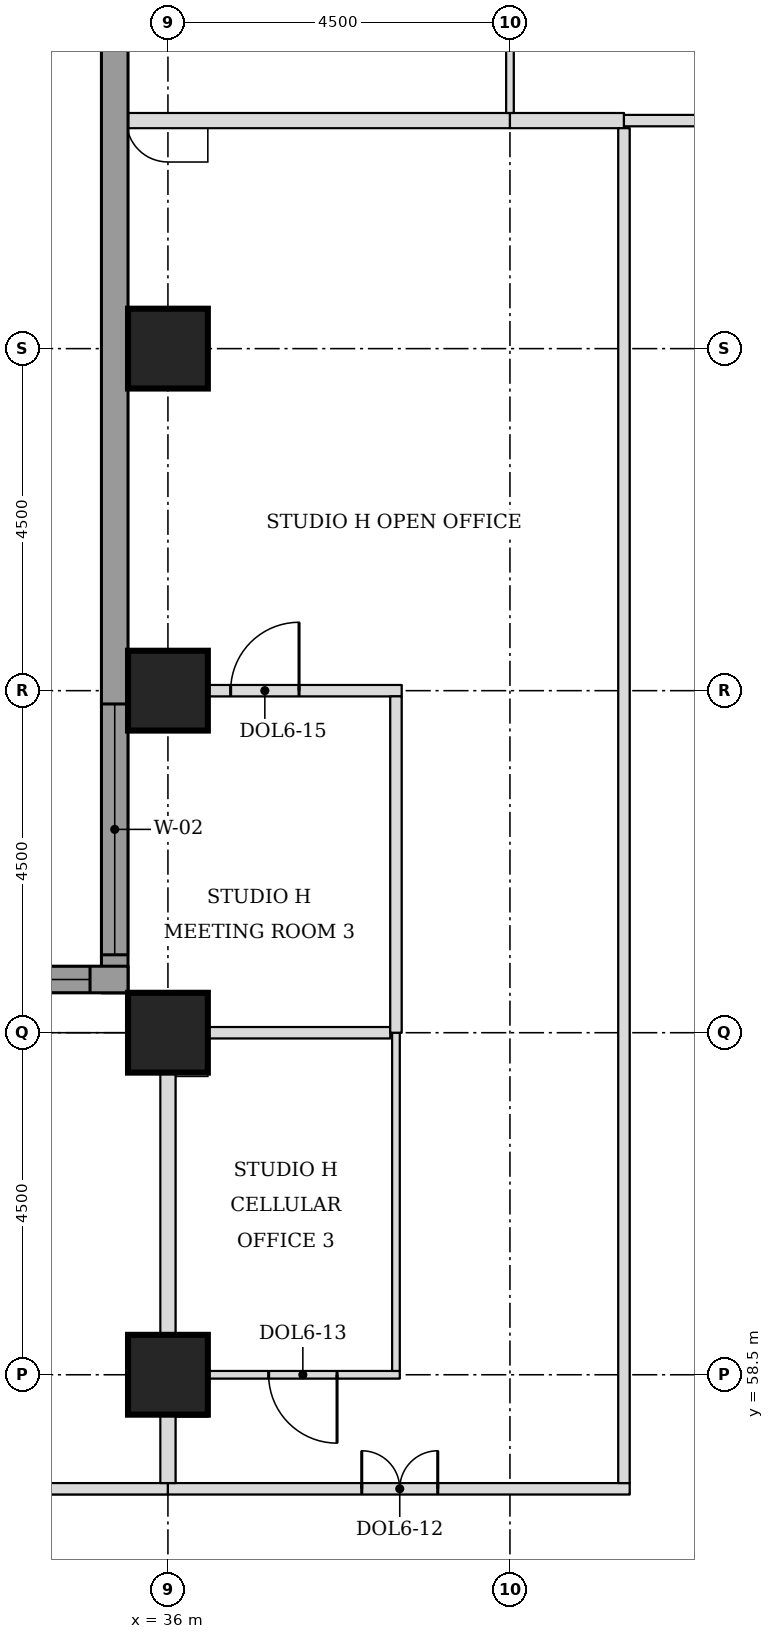
"""IFC4 building model, lengths in metres.
Left out: names, types, materials, properties, quantities, classifications, styles, units other than length and angle.
Written with IfcOpenShell. Run it as: python <this file> out.ifc"""

import sys

from ifc_helpers import new_model, si_unit, direction, frame, frame_2d, origin, origin_2d, place, context, subcontext, project, spatial, rectangle, extrude, element, fill, save


model = new_model("IFC4")
c1 = context("Model", 3, precision=1e-05, world=origin(), true_north=direction((0.0, 1.0)))
c2 = subcontext(c1, "Body", "Model", "MODEL_VIEW")
j1 = project(units=[si_unit("LENGTHUNIT", "METRE"), si_unit("PLANEANGLEUNIT", "RADIAN")], contexts=[c1])
p1 = place(None, origin())
s1 = spatial("IfcSite", under=j1, at=p1, CompositionType="ELEMENT")
p2 = place(p1, origin())
s2 = spatial("IfcBuilding", under=s1, at=p2, CompositionType="ELEMENT")
p3 = place(p2, frame((0.0, 0.0, 115.9)))
s3 = spatial("IfcBuildingStorey", under=s2, at=p3, CompositionType="ELEMENT", Elevation=115.9)
for number, where, z_axis, x_axis in (
    (1, (36.0, 58.5, 0.0), (0.0, 0.0, 1.0), (1.0, 0.0, 0.0)),
    (2, (36.0, 63.0, 0.0), (0.0, 0.0, 1.0), (1.0, 0.0, 0.0)),
    (3, (36.0, 67.5, 0.0), (0.0, 0.0, 1.0), (1.0, 0.0, 0.0)),
    (4, (36.0, 72.0, 0.0), (0.0, 0.0, 1.0), (1.0, 0.0, 0.0)),
):
    element("IfcColumn", number, at=place(p3, frame(where, z_axis=z_axis, x_axis=x_axis)), inside=s3, PredefinedType="COLUMN", context=c2, shape_type="SweptSolid", body=[
        extrude(rectangle(XDim=1.05, YDim=1.05, at=origin_2d()), origin(), (0.0, 0.0, 1.0), 3.7),
    ])
p4 = place(p3, frame((35.3, 76.862, 0.0), z_axis=(0.0, 0.0, 1.0), x_axis=(0.0, -1.0, 0.0)))
e5 = element("IfcWall", 5, at=p4, inside=s3, PredefinedType="STANDARD", context=c2, shape_type="SweptSolid", body=[
    extrude(rectangle(XDim=13.337, YDim=0.35, at=frame_2d((6.669, 0.0))), origin(), (0.0, 0.0, 1.0), 3.525),
])
p5 = place(p4, frame((9.537, 0.0, 0.9)))
e6 = element("IfcOpeningElement", 6, at=p5, cuts=e5, PredefinedType="OPENING", context=c2, shape_type="SweptSolid", body=[
    extrude(rectangle(XDim=3.3, YDim=1.9, at=frame_2d((1.65, 0.95))), frame((0.0, 0.185, 0.0), z_axis=(0.0, -1.0, 0.0), x_axis=(1.0, 0.0, 0.0)), (0.0, 0.0, 1.0), 0.37),
])
p6 = place(p3, frame((35.475, 63.7, 0.0), z_axis=(0.0, 0.0, 1.0), x_axis=(-1.0, 0.0, 0.0)))
e7 = element("IfcWall", 7, at=p6, inside=s3, PredefinedType="STANDARD", context=c2, shape_type="SweptSolid", body=[
    extrude(rectangle(XDim=17.837, YDim=0.35, at=frame_2d((8.919, 0.0))), origin(), (0.0, 0.0, 1.0), 3.525),
])
p7 = place(p6, frame((0.5, 0.0, 0.9)))
e8 = element("IfcOpeningElement", 8, at=p7, cuts=e7, PredefinedType="OPENING", context=c2, shape_type="SweptSolid", body=[
    extrude(rectangle(XDim=3.3, YDim=1.9, at=frame_2d((1.65, 0.95))), frame((0.0, 0.185, 0.0), z_axis=(0.0, -1.0, 0.0), x_axis=(1.0, 0.0, 0.0)), (0.0, 0.0, 1.0), 0.37),
])
p8 = place(p6, frame((9.075, 0.0, 0.9)))
e9 = element("IfcOpeningElement", 9, at=p8, cuts=e7, PredefinedType="OPENING", context=c2, shape_type="SweptSolid", body=[
    extrude(rectangle(XDim=3.3, YDim=1.9, at=frame_2d((1.65, 0.95))), frame((0.0, 0.185, 0.0), z_axis=(0.0, -1.0, 0.0), x_axis=(1.0, 0.0, 0.0)), (0.0, 0.0, 1.0), 0.37),
])
p9 = place(p3, frame((29.38, 57.0, 0.0), z_axis=(0.0, 0.0, 1.0), x_axis=(1.0, 0.0, 0.0)))
e10 = element("IfcWall", 10, at=p9, inside=s3, PredefinedType="PARTITIONING", context=c2, shape_type="SweptSolid", body=[
    extrude(rectangle(XDim=6.62, YDim=0.15, at=frame_2d((3.31, 0.0))), origin(), (0.0, 0.0, 1.0), 3.55),
])
p10 = place(p9, frame((2.88, 0.0, 0.0)))
e11 = element("IfcOpeningElement", 11, at=p10, cuts=e10, PredefinedType="OPENING", context=c2, shape_type="SweptSolid", body=[
    extrude(rectangle(XDim=1.0, YDim=2.1, at=frame_2d((0.5, 1.05))), frame((0.0, 0.085, 0.0), z_axis=(0.0, -1.0, 0.0), x_axis=(1.0, 0.0, 0.0)), (0.0, 0.0, 1.0), 0.17),
])
p11 = place(p3, frame((36.0, 57.0, 0.0), z_axis=(0.0, 0.0, 1.0), x_axis=(1.0, 0.0, 0.0)))
e12 = element("IfcWall", 12, at=p11, inside=s3, PredefinedType="PARTITIONING", context=c2, shape_type="SweptSolid", body=[
    extrude(rectangle(XDim=6.075, YDim=0.15, at=frame_2d((3.038, 0.0))), origin(), (0.0, 0.0, 1.0), 3.55),
])
p12 = place(p11, frame((2.55, 0.0, 0.0)))
e13 = element("IfcOpeningElement", 13, at=p12, cuts=e12, PredefinedType="OPENING", context=c2, shape_type="SweptSolid", body=[
    extrude(rectangle(XDim=1.0, YDim=2.1, at=frame_2d((0.5, 1.05))), frame((0.0, 0.085, 0.0), z_axis=(0.0, -1.0, 0.0), x_axis=(1.0, 0.0, 0.0)), (0.0, 0.0, 1.0), 0.17),
])
p13 = place(p3, frame((36.525, 58.5, 0.0), z_axis=(0.0, 0.0, 1.0), x_axis=(1.0, 0.0, 0.0)))
e14 = element("IfcWall", 14, at=p13, inside=s3, PredefinedType="PARTITIONING", context=c2, shape_type="SweptSolid", body=[
    extrude(rectangle(XDim=2.525, YDim=0.1, at=frame_2d((1.263, 0.0))), origin(), (0.0, 0.0, 1.0), 3.55),
])
p14 = place(p13, frame((0.8, 0.0, 0.0)))
e15 = element("IfcOpeningElement", 15, at=p14, cuts=e14, PredefinedType="OPENING", context=c2, shape_type="SweptSolid", body=[
    extrude(rectangle(XDim=0.9, YDim=2.1, at=frame_2d((0.45, 1.05))), frame((0.0, 0.06, 0.0), z_axis=(0.0, -1.0, 0.0), x_axis=(1.0, 0.0, 0.0)), (0.0, 0.0, 1.0), 0.12),
])
p15 = place(p3, frame((36.525, 63.0, 0.0), z_axis=(0.0, 0.0, 1.0), x_axis=(1.0, 0.0, 0.0)))
e16 = element("IfcWall", 16, at=p15, inside=s3, PredefinedType="PARTITIONING", context=c2, shape_type="SweptSolid", body=[
    extrude(rectangle(XDim=2.4, YDim=0.15, at=frame_2d((1.2, 0.0))), origin(), (0.0, 0.0, 1.0), 3.55),
])
p16 = place(p3, frame((35.475, 67.5, 0.0), z_axis=(0.0, 0.0, 1.0), x_axis=(1.0, 0.0, 0.0)))
e17 = element("IfcWall", 17, at=p16, inside=s3, PredefinedType="PARTITIONING", context=c2, shape_type="SweptSolid", body=[
    extrude(rectangle(XDim=3.6, YDim=0.15, at=frame_2d((1.8, 0.0))), origin(), (0.0, 0.0, 1.0), 3.55),
])
p17 = place(p16, frame((1.35, 0.0, 0.0)))
e18 = element("IfcOpeningElement", 18, at=p17, cuts=e17, PredefinedType="OPENING", context=c2, shape_type="SweptSolid", body=[
    extrude(rectangle(XDim=0.9, YDim=2.1, at=frame_2d((0.45, 1.05))), frame((0.0, 0.085, 0.0), z_axis=(0.0, -1.0, 0.0), x_axis=(1.0, 0.0, 0.0)), (0.0, 0.0, 1.0), 0.17),
])
p18 = place(p3, frame((35.475, 75.0, 0.0), z_axis=(0.0, 0.0, 1.0), x_axis=(1.0, 0.0, 0.0)))
e19 = element("IfcWall", 19, at=p18, inside=s3, PredefinedType="PARTITIONING", context=c2, shape_type="SweptSolid", body=[
    extrude(rectangle(XDim=5.025, YDim=0.2, at=frame_2d((2.512, 0.0))), origin(), (0.0, 0.0, 1.0), 3.55),
])
p19 = place(p3, frame((40.5, 75.0, 0.0), z_axis=(0.0, 0.0, 1.0), x_axis=(1.0, 0.0, 0.0)))
e20 = element("IfcWall", 20, at=p19, inside=s3, PredefinedType="PARTITIONING", context=c2, shape_type="SweptSolid", body=[
    extrude(rectangle(XDim=1.5, YDim=0.2, at=frame_2d((0.75, 0.0))), origin(), (0.0, 0.0, 1.0), 3.55),
])
p20 = place(p3, frame((42.0, 75.0, 0.0), z_axis=(0.0, 0.0, 1.0), x_axis=(1.0, 0.0, 0.0)))
e21 = element("IfcWall", 21, at=p20, inside=s3, PredefinedType="PARTITIONING", context=c2, shape_type="SweptSolid", body=[
    extrude(rectangle(XDim=4.5, YDim=0.15, at=frame_2d((2.25, 0.0))), origin(), (0.0, 0.0, 1.0), 3.55),
])
p21 = place(p20, frame((1.75, 0.0, 0.0)))
e22 = element("IfcOpeningElement", 22, at=p21, cuts=e21, PredefinedType="OPENING", context=c2, shape_type="SweptSolid", body=[
    extrude(rectangle(XDim=1.0, YDim=2.1, at=frame_2d((0.5, 1.05))), frame((0.0, 0.085, 0.0), z_axis=(0.0, -1.0, 0.0), x_axis=(1.0, 0.0, 0.0)), (0.0, 0.0, 1.0), 0.17),
])
p22 = place(p3, frame((36.0, 57.075, 0.0), z_axis=(0.0, 0.0, 1.0), x_axis=(0.0, 1.0, 0.0)))
e23 = element("IfcWall", 23, at=p22, inside=s3, PredefinedType="PARTITIONING", context=c2, shape_type="SweptSolid", body=[
    extrude(rectangle(XDim=0.9, YDim=0.2, at=frame_2d((0.45, 0.0))), origin(), (0.0, 0.0, 1.0), 2.8),
])
p23 = place(p3, frame((42.0, 57.075, 0.0), z_axis=(0.0, 0.0, 1.0), x_axis=(0.0, 1.0, 0.0)))
e24 = element("IfcWall", 24, at=p23, inside=s3, PredefinedType="PARTITIONING", context=c2, shape_type="SweptSolid", body=[
    extrude(rectangle(XDim=17.825, YDim=0.15, at=frame_2d((8.913, 0.0))), origin(), (0.0, 0.0, 1.0), 3.55),
])
p24 = place(p3, frame((39.0, 58.55, 0.0), z_axis=(0.0, 0.0, 1.0), x_axis=(0.0, 1.0, 0.0)))
e25 = element("IfcWall", 25, at=p24, inside=s3, PredefinedType="PARTITIONING", context=c2, shape_type="SweptSolid", body=[
    extrude(rectangle(XDim=4.45, YDim=0.1, at=frame_2d((2.225, 0.0))), origin(), (0.0, 0.0, 1.0), 3.55),
])
p25 = place(p3, frame((36.0, 58.995, 0.0), z_axis=(0.0, 0.0, 1.0), x_axis=(0.0, 1.0, 0.0)))
e26 = element("IfcWall", 26, at=p25, inside=s3, PredefinedType="PARTITIONING", context=c2, shape_type="SweptSolid", body=[
    extrude(rectangle(XDim=3.48, YDim=0.2, at=frame_2d((1.74, 0.0))), origin(), (0.0, 0.0, 1.0), 2.8),
])
p26 = place(p3, frame((39.0, 63.0, 0.0), z_axis=(0.0, 0.0, 1.0), x_axis=(0.0, 1.0, 0.0)))
e27 = element("IfcWall", 27, at=p26, inside=s3, PredefinedType="PARTITIONING", context=c2, shape_type="SweptSolid", body=[
    extrude(rectangle(XDim=4.425, YDim=0.15, at=frame_2d((2.212, 0.0))), origin(), (0.0, 0.0, 1.0), 3.55),
])
p27 = place(p3, frame((40.5, 75.1, 0.0), z_axis=(0.0, 0.0, 1.0), x_axis=(0.0, 1.0, 0.0)))
e28 = element("IfcWall", 28, at=p27, inside=s3, PredefinedType="PARTITIONING", context=c2, shape_type="SweptSolid", body=[
    extrude(rectangle(XDim=2.9, YDim=0.1, at=frame_2d((1.45, 0.0))), origin(), (0.0, 0.0, 1.0), 3.55),
])
p28 = place(p27, frame((1.0, 0.0, 0.0)))
e29 = element("IfcOpeningElement", 29, at=p28, cuts=e28, PredefinedType="OPENING", context=c2, shape_type="SweptSolid", body=[
    extrude(rectangle(XDim=0.9, YDim=2.1, at=frame_2d((0.45, 1.05))), frame((0.0, 0.06, 0.0), z_axis=(0.0, -1.0, 0.0), x_axis=(1.0, 0.0, 0.0)), (0.0, 0.0, 1.0), 0.12),
])
p29 = place(p5, origin())
e30 = element("IfcWindow", 30, at=p29, inside=s3, PartitioningType="SINGLE_PANEL", PredefinedType="WINDOW", context=c2, shape_type="SweptSolid", body=[
    extrude(rectangle(XDim=3.3, YDim=1.9, at=frame_2d((1.65, 0.95))), frame((0.0, 0.085, 0.0), z_axis=(0.0, -1.0, 0.0), x_axis=(1.0, 0.0, 0.0)), (0.0, 0.0, 1.0), 0.06),
])
fill(e6, e30)
p30 = place(p7, origin())
e31 = element("IfcWindow", 31, at=p30, inside=s3, PartitioningType="SINGLE_PANEL", PredefinedType="WINDOW", context=c2, shape_type="SweptSolid", body=[
    extrude(rectangle(XDim=3.3, YDim=1.9, at=frame_2d((1.65, 0.95))), frame((0.0, 0.085, 0.0), z_axis=(0.0, -1.0, 0.0), x_axis=(1.0, 0.0, 0.0)), (0.0, 0.0, 1.0), 0.06),
])
fill(e8, e31)
p31 = place(p12, origin())
e32 = element("IfcDoor", 32, at=p31, inside=s3, OperationType="DOUBLE_DOOR_SINGLE_SWING", PredefinedType="DOOR", context=c2, shape_type="SweptSolid", body=[
    extrude(rectangle(XDim=1.0, YDim=2.1, at=frame_2d((0.5, 1.05))), frame((0.0, 0.025, 0.0), z_axis=(0.0, -1.0, 0.0), x_axis=(1.0, 0.0, 0.0)), (0.0, 0.0, 1.0), 0.05),
])
fill(e13, e32)
p32 = place(p14, frame((0.9, 0.0, 0.0), z_axis=(0.0, 0.0, 1.0), x_axis=(-1.0, 0.0, 0.0)))
e33 = element("IfcDoor", 33, at=p32, inside=s3, OperationType="SINGLE_SWING_LEFT", PredefinedType="DOOR", context=c2, shape_type="SweptSolid", body=[
    extrude(rectangle(XDim=0.9, YDim=2.1, at=frame_2d((0.45, 1.05))), frame((0.0, 0.025, 0.0), z_axis=(0.0, -1.0, 0.0), x_axis=(1.0, 0.0, 0.0)), (0.0, 0.0, 1.0), 0.05),
])
fill(e15, e33)
p33 = place(p17, origin())
e34 = element("IfcDoor", 34, at=p33, inside=s3, OperationType="SINGLE_SWING_RIGHT", PredefinedType="DOOR", context=c2, shape_type="SweptSolid", body=[
    extrude(rectangle(XDim=0.9, YDim=2.1, at=frame_2d((0.45, 1.05))), frame((0.0, 0.025, 0.0), z_axis=(0.0, -1.0, 0.0), x_axis=(1.0, 0.0, 0.0)), (0.0, 0.0, 1.0), 0.05),
])
fill(e18, e34)
save(model, sys.argv[1])
